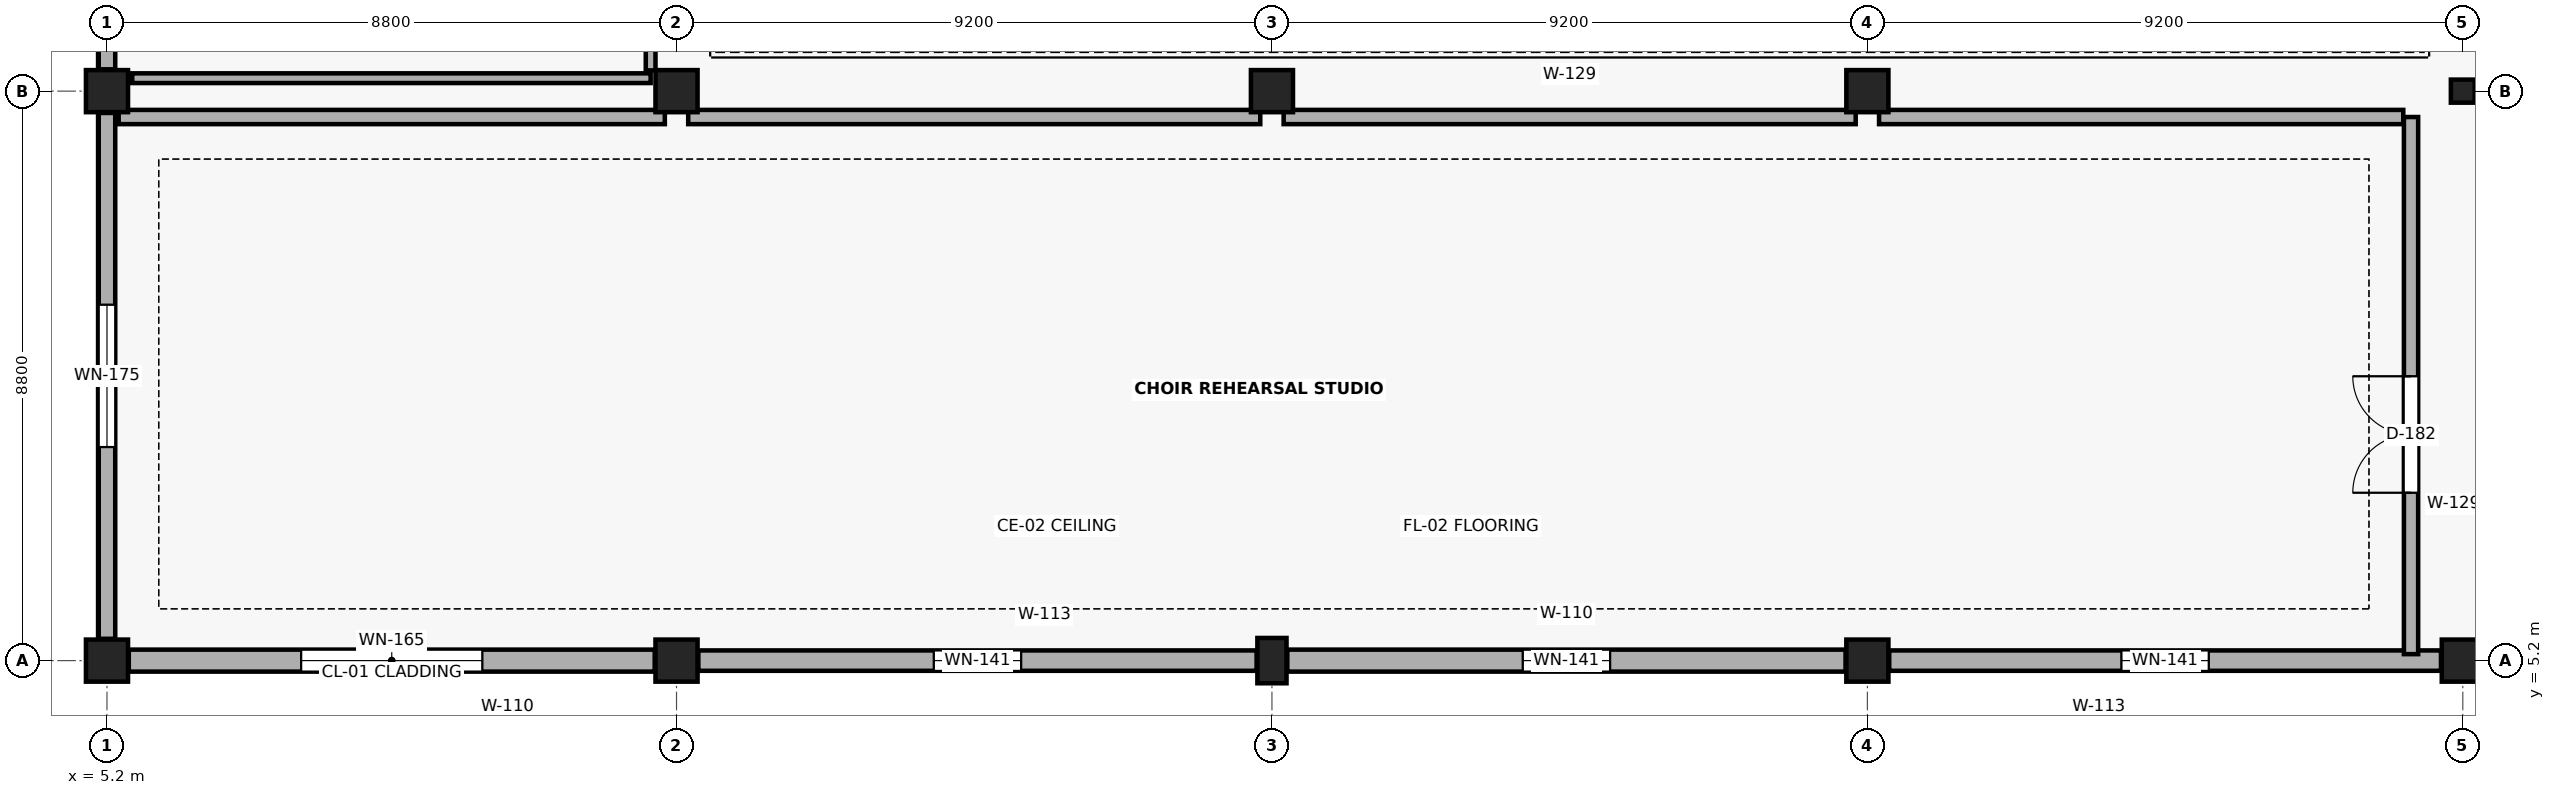
"""IFC4 building model, lengths in metres.
Left out: names, types, materials, properties, quantities, classifications, styles, units other than length and angle.
Written with IfcOpenShell. Run it as: python <this file> out.ifc"""

import sys

from ifc_helpers import new_model, si_unit, direction, frame, frame_2d, origin, origin_2d, place, context, subcontext, project, spatial, rectangle, i_section, extrude, element, fill, save


model = new_model("IFC4")
c1 = context("Model", 3, precision=1e-05, world=origin(), true_north=direction((0.0, 1.0)))
c2 = subcontext(c1, "Body", "Model", "MODEL_VIEW")
j1 = project(units=[si_unit("LENGTHUNIT", "METRE"), si_unit("PLANEANGLEUNIT", "RADIAN")], contexts=[c1])
p1 = place(None, origin())
s1 = spatial("IfcSite", under=j1, at=p1, CompositionType="ELEMENT")
p2 = place(p1, origin())
s2 = spatial("IfcBuilding", under=s1, at=p2, CompositionType="ELEMENT")
p3 = place(p2, frame((0.0, 0.0, 5.1)))
s3 = spatial("IfcBuildingStorey", under=s2, at=p3, CompositionType="ELEMENT", Elevation=5.1)
for number, where, z_axis, x_axis in (
    (1, (5.2, 5.2, 0.0), (0.0, 0.0, 1.0), (1.0, 0.0, 0.0)),
    (2, (5.2, 14.0, 0.0), (0.0, 0.0, 1.0), (1.0, 0.0, 0.0)),
    (3, (14.0, 5.2, 0.0), (0.0, 0.0, 1.0), (1.0, 0.0, 0.0)),
    (4, (14.0, 14.0, 0.0), (0.0, 0.0, 1.0), (1.0, 0.0, 0.0)),
):
    element("IfcColumn", number, at=place(p3, frame(where, z_axis=z_axis, x_axis=x_axis)), inside=s3, PredefinedType="COLUMN", context=c2, shape_type="SweptSolid", body=[
        extrude(rectangle(XDim=0.65, YDim=0.65, at=origin_2d()), origin(), (0.0, 0.0, 1.0), 4.8),
    ])
p4 = place(p3, frame((23.2, 5.2, 0.0), z_axis=(0.0, 0.0, 1.0), x_axis=(1.0, 0.0, 0.0)))
e5 = element("IfcColumn", 5, at=p4, inside=s3, PredefinedType="PILASTER", context=c2, shape_type="SweptSolid", body=[
    extrude(rectangle(XDim=0.45, YDim=0.7, at=origin_2d()), origin(), (0.0, 0.0, 1.0), 4.8),
])
for number, where, z_axis, x_axis in (
    (6, (23.2, 14.0, 0.0), (0.0, 0.0, 1.0), (1.0, 0.0, 0.0)),
    (7, (32.4, 5.2, 0.0), (0.0, 0.0, 1.0), (1.0, 0.0, 0.0)),
    (8, (32.4, 14.0, 0.0), (0.0, 0.0, 1.0), (1.0, 0.0, 0.0)),
    (9, (41.6, 5.2, 0.0), (0.0, 0.0, 1.0), (1.0, 0.0, 0.0)),
):
    element("IfcColumn", number, at=place(p3, frame(where, z_axis=z_axis, x_axis=x_axis)), inside=s3, PredefinedType="COLUMN", context=c2, shape_type="SweptSolid", body=[
        extrude(rectangle(XDim=0.65, YDim=0.65, at=origin_2d()), origin(), (0.0, 0.0, 1.0), 4.8),
    ])
p5 = place(p3, frame((41.6, 14.0, 0.0), z_axis=(0.0, 0.0, 1.0), x_axis=(1.0, 0.0, 0.0)))
e10 = element("IfcColumn", 10, at=p5, inside=s3, PredefinedType="COLUMN", context=c2, shape_type="SweptSolid", body=[
    extrude(i_section(OverallWidth=0.369, OverallDepth=0.356, WebThickness=0.011, FlangeThickness=0.018, at=origin_2d()), origin(), (0.0, 0.0, 1.0), 4.8),
])
p6 = place(p3, frame((13.663, 5.2, 0.0), z_axis=(0.0, 0.0, 1.0), x_axis=(-1.0, 0.0, 0.0)))
e11 = element("IfcWall", 11, at=p6, inside=s3, PredefinedType="SOLIDWALL", context=c2, shape_type="SweptSolid", body=[
    extrude(rectangle(XDim=8.126, YDim=0.34, at=frame_2d((4.063, 0.0))), origin(), (0.0, 0.0, 1.0), 3.61),
])
p7 = place(p6, frame((2.663, 0.0, 0.85)))
e12 = element("IfcOpeningElement", 12, at=p7, cuts=e11, PredefinedType="OPENING", context=c2, shape_type="SweptSolid", body=[
    extrude(rectangle(XDim=2.8, YDim=2.45, at=frame_2d((1.4, 1.225))), frame((0.0, 0.182, 0.0), z_axis=(0.0, -1.0, 0.0), x_axis=(1.0, 0.0, 0.0)), (0.0, 0.0, 1.0), 0.364),
])
p8 = place(p3, frame((22.963, 5.2, 0.0), z_axis=(0.0, 0.0, 1.0), x_axis=(-1.0, 0.0, 0.0)))
e13 = element("IfcWall", 13, at=p8, inside=s3, PredefinedType="SOLIDWALL", context=c2, shape_type="SweptSolid", body=[
    extrude(rectangle(XDim=8.626, YDim=0.315, at=frame_2d((4.313, 0.0))), origin(), (0.0, 0.0, 1.0), 3.61),
])
p9 = place(p8, frame((3.638, 0.0, 0.85)))
e14 = element("IfcOpeningElement", 14, at=p9, cuts=e13, PredefinedType="OPENING", context=c2, shape_type="SweptSolid", body=[
    extrude(rectangle(XDim=1.35, YDim=2.95, at=frame_2d((0.675, 1.475))), frame((0.0, 0.169, 0.0), z_axis=(0.0, -1.0, 0.0), x_axis=(1.0, 0.0, 0.0)), (0.0, 0.0, 1.0), 0.339),
])
p10 = place(p3, frame((32.063, 5.2, 0.0), z_axis=(0.0, 0.0, 1.0), x_axis=(-1.0, 0.0, 0.0)))
e15 = element("IfcWall", 15, at=p10, inside=s3, PredefinedType="SOLIDWALL", context=c2, shape_type="SweptSolid", body=[
    extrude(rectangle(XDim=8.626, YDim=0.34, at=frame_2d((4.313, 0.0))), origin(), (0.0, 0.0, 1.0), 3.61),
])
p11 = place(p10, frame((3.638, 0.0, 0.85)))
e16 = element("IfcOpeningElement", 16, at=p11, cuts=e15, PredefinedType="OPENING", context=c2, shape_type="SweptSolid", body=[
    extrude(rectangle(XDim=1.35, YDim=2.95, at=frame_2d((0.675, 1.475))), frame((0.0, 0.182, 0.0), z_axis=(0.0, -1.0, 0.0), x_axis=(1.0, 0.0, 0.0)), (0.0, 0.0, 1.0), 0.364),
])
p12 = place(p3, frame((41.263, 5.2, 0.0), z_axis=(0.0, 0.0, 1.0), x_axis=(-1.0, 0.0, 0.0)))
e17 = element("IfcWall", 17, at=p12, inside=s3, PredefinedType="SOLIDWALL", context=c2, shape_type="SweptSolid", body=[
    extrude(rectangle(XDim=8.526, YDim=0.315, at=frame_2d((4.263, 0.0))), origin(), (0.0, 0.0, 1.0), 3.61),
])
p13 = place(p12, frame((3.588, 0.0, 0.85)))
e18 = element("IfcOpeningElement", 18, at=p13, cuts=e17, PredefinedType="OPENING", context=c2, shape_type="SweptSolid", body=[
    extrude(rectangle(XDim=1.35, YDim=2.95, at=frame_2d((0.675, 1.475))), frame((0.0, 0.169, 0.0), z_axis=(0.0, -1.0, 0.0), x_axis=(1.0, 0.0, 0.0)), (0.0, 0.0, 1.0), 0.339),
])
p14 = place(p3, frame((5.2, 5.537, 0.0), z_axis=(0.0, 0.0, 1.0), x_axis=(0.0, 1.0, 0.0)))
e19 = element("IfcWall", 19, at=p14, inside=s3, PredefinedType="SOLIDWALL", context=c2, shape_type="SweptSolid", body=[
    extrude(rectangle(XDim=8.126, YDim=0.255, at=frame_2d((4.063, 0.0))), origin(), (0.0, 0.0, 1.0), 3.61),
])
p15 = place(p14, frame((2.963, 0.0, 0.85)))
e20 = element("IfcOpeningElement", 20, at=p15, cuts=e19, PredefinedType="OPENING", context=c2, shape_type="SweptSolid", body=[
    extrude(rectangle(XDim=2.2, YDim=2.3, at=frame_2d((1.1, 1.15))), frame((0.0, 0.139, 0.0), z_axis=(0.0, -1.0, 0.0), x_axis=(1.0, 0.0, 0.0)), (0.0, 0.0, 1.0), 0.279),
])
p16 = place(p3, frame((5.2, 14.337, 0.0), z_axis=(0.0, 0.0, 1.0), x_axis=(0.0, 1.0, 0.0)))
e21 = element("IfcWall", 21, at=p16, inside=s3, PredefinedType="SOLIDWALL", context=c2, shape_type="SweptSolid", body=[
    extrude(rectangle(XDim=8.526, YDim=0.255, at=frame_2d((4.263, 0.0))), origin(), (0.0, 0.0, 1.0), 3.61),
])
p17 = place(p16, frame((3.588, 0.0, 0.85)))
e22 = element("IfcOpeningElement", 22, at=p17, cuts=e21, PredefinedType="OPENING", context=c2, shape_type="SweptSolid", body=[
    extrude(rectangle(XDim=1.35, YDim=2.95, at=frame_2d((0.675, 1.475))), frame((0.0, 0.139, 0.0), z_axis=(0.0, -1.0, 0.0), x_axis=(1.0, 0.0, 0.0)), (0.0, 0.0, 1.0), 0.279),
])
p18 = place(p3, frame((40.8, 5.3, 0.0), z_axis=(0.0, 0.0, 1.0), x_axis=(0.0, 1.0, 0.0)))
e23 = element("IfcWall", 23, at=p18, inside=s3, PredefinedType="PARTITIONING", context=c2, shape_type="SweptSolid", body=[
    extrude(rectangle(XDim=8.3, YDim=0.22, at=frame_2d((4.15, 0.0))), origin(), (0.0, 0.0, 1.0), 4.47),
])
p19 = place(p18, frame((2.494, 0.0, 0.0)))
e24 = element("IfcOpeningElement", 24, at=p19, cuts=e23, PredefinedType="OPENING", context=c2, shape_type="SweptSolid", body=[
    extrude(rectangle(XDim=1.8, YDim=2.45, at=frame_2d((0.9, 1.225))), frame((0.0, 0.122, 0.0), z_axis=(0.0, -1.0, 0.0), x_axis=(1.0, 0.0, 0.0)), (0.0, 0.0, 1.0), 0.244),
])
p20 = place(p3, frame((40.68, 13.6, 0.0), z_axis=(0.0, 0.0, 1.0), x_axis=(-1.0, 0.0, 0.0)))
e25 = element("IfcWall", 25, at=p20, inside=s3, PredefinedType="PARTITIONING", context=c2, shape_type="SweptSolid", body=[
    extrude(rectangle(XDim=8.099, YDim=0.22, at=frame_2d((4.05, 0.0))), origin(), (0.0, 0.0, 1.0), 4.47),
])
for number, where, z_axis, x_axis in (
    (26, (32.219, 13.6, 0.0), (0.0, 0.0, 1.0), (-1.0, 0.0, 0.0)),
    (27, (23.02, 13.6, 0.0), (0.0, 0.0, 1.0), (-1.0, 0.0, 0.0)),
):
    element("IfcWall", number, at=place(p3, frame(where, z_axis=z_axis, x_axis=x_axis)), inside=s3, PredefinedType="PARTITIONING", context=c2, shape_type="SweptSolid", body=[
        extrude(rectangle(XDim=8.839, YDim=0.22, at=frame_2d((4.419, 0.0))), origin(), (0.0, 0.0, 1.0), 4.47),
    ])
p21 = place(p3, frame((13.819, 13.6, 0.0), z_axis=(0.0, 0.0, 1.0), x_axis=(-1.0, 0.0, 0.0)))
e28 = element("IfcWall", 28, at=p21, inside=s3, PredefinedType="PARTITIONING", context=c2, shape_type="SweptSolid", body=[
    extrude(rectangle(XDim=8.439, YDim=0.22, at=frame_2d((4.219, 0.0))), origin(), (0.0, 0.0, 1.0), 4.47),
])
p22 = place(p3, frame((5.59, 14.2, 0.0), z_axis=(0.0, 0.0, 1.0), x_axis=(1.0, 0.0, 0.0)))
e29 = element("IfcWall", 29, at=p22, inside=s3, PredefinedType="PARTITIONING", context=c2, shape_type="SweptSolid", body=[
    extrude(rectangle(XDim=8.01, YDim=0.15, at=frame_2d((4.005, 0.0))), origin(), (0.0, 0.0, 1.0), 4.47),
])
p23 = place(p3, frame((13.6, 14.32, 0.0), z_axis=(0.0, 0.0, 1.0), x_axis=(0.0, 1.0, 0.0)))
e30 = element("IfcWall", 30, at=p23, inside=s3, PredefinedType="PARTITIONING", context=c2, shape_type="SweptSolid", body=[
    extrude(rectangle(XDim=8.699, YDim=0.15, at=frame_2d((4.35, 0.0))), origin(), (0.0, 0.0, 1.0), 4.47),
])
p24 = place(p7, origin())
e31 = element("IfcWindow", 31, at=p24, inside=s3, PartitioningType="SINGLE_PANEL", PredefinedType="WINDOW", context=c2, shape_type="SweptSolid", body=[
    extrude(rectangle(XDim=2.8, YDim=2.45, at=frame_2d((1.4, 1.225))), frame((0.0, 0.03, 0.0), z_axis=(0.0, -1.0, 0.0), x_axis=(1.0, 0.0, 0.0)), (0.0, 0.0, 1.0), 0.06),
])
fill(e12, e31)
p25 = place(p9, origin())
e32 = element("IfcWindow", 32, at=p25, inside=s3, PartitioningType="SINGLE_PANEL", PredefinedType="WINDOW", context=c2, shape_type="SweptSolid", body=[
    extrude(rectangle(XDim=1.35, YDim=2.95, at=frame_2d((0.675, 1.475))), frame((0.0, 0.03, 0.0), z_axis=(0.0, -1.0, 0.0), x_axis=(1.0, 0.0, 0.0)), (0.0, 0.0, 1.0), 0.06),
])
fill(e14, e32)
p26 = place(p11, origin())
e33 = element("IfcWindow", 33, at=p26, inside=s3, PartitioningType="SINGLE_PANEL", PredefinedType="WINDOW", context=c2, shape_type="SweptSolid", body=[
    extrude(rectangle(XDim=1.35, YDim=2.95, at=frame_2d((0.675, 1.475))), frame((0.0, 0.03, 0.0), z_axis=(0.0, -1.0, 0.0), x_axis=(1.0, 0.0, 0.0)), (0.0, 0.0, 1.0), 0.06),
])
fill(e16, e33)
p27 = place(p13, origin())
e34 = element("IfcWindow", 34, at=p27, inside=s3, PartitioningType="SINGLE_PANEL", PredefinedType="WINDOW", context=c2, shape_type="SweptSolid", body=[
    extrude(rectangle(XDim=1.35, YDim=2.95, at=frame_2d((0.675, 1.475))), frame((0.0, 0.03, 0.0), z_axis=(0.0, -1.0, 0.0), x_axis=(1.0, 0.0, 0.0)), (0.0, 0.0, 1.0), 0.06),
])
fill(e18, e34)
p28 = place(p15, origin())
e35 = element("IfcWindow", 35, at=p28, inside=s3, PartitioningType="SINGLE_PANEL", PredefinedType="WINDOW", context=c2, shape_type="SweptSolid", body=[
    extrude(rectangle(XDim=2.2, YDim=2.3, at=frame_2d((1.1, 1.15))), frame((0.0, 0.03, 0.0), z_axis=(0.0, -1.0, 0.0), x_axis=(1.0, 0.0, 0.0)), (0.0, 0.0, 1.0), 0.06),
])
fill(e20, e35)
p29 = place(p19, origin())
e36 = element("IfcDoor", 36, at=p29, inside=s3, OperationType="DOUBLE_DOOR_SINGLE_SWING", PredefinedType="DOOR", context=c2, shape_type="SweptSolid", body=[
    extrude(rectangle(XDim=1.8, YDim=2.45, at=frame_2d((0.9, 1.225))), frame((0.0, 0.025, 0.0), z_axis=(0.0, -1.0, 0.0), x_axis=(1.0, 0.0, 0.0)), (0.0, 0.0, 1.0), 0.05),
])
fill(e24, e36)
save(model, sys.argv[1])
